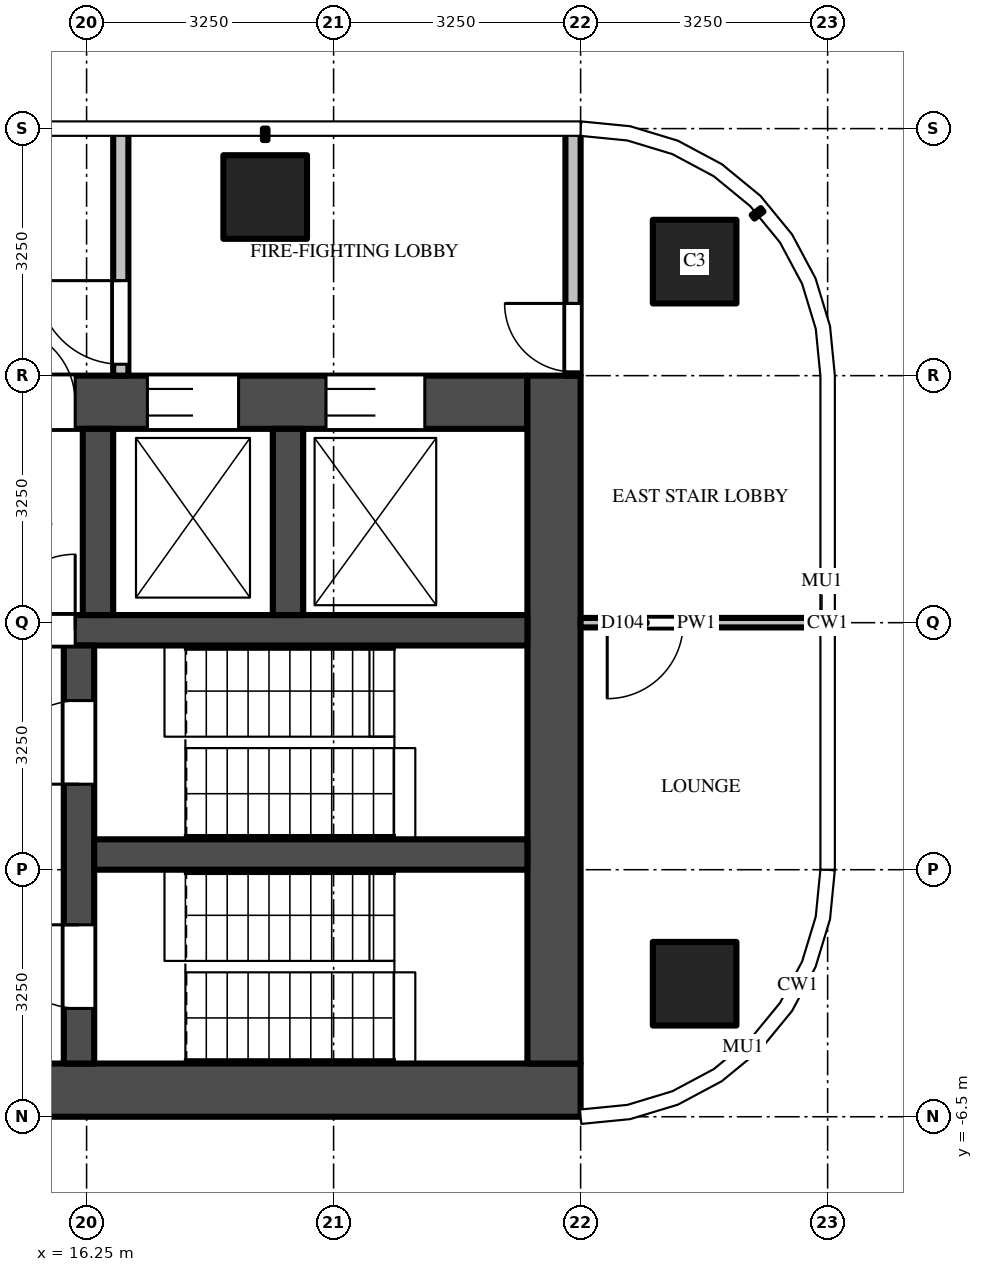
"""IFC4 building model, lengths in metres.
Left out: names, types, materials, properties, quantities, classifications, styles, units other than length and angle.
Written with IfcOpenShell. Run it as: python <this file> out.ifc"""

import sys

from ifc_helpers import new_model, si_unit, direction, frame, frame_2d, origin, origin_2d, place, context, subcontext, project, spatial, rectangle, extrude, source, transform, mapped, element, fill, save


model = new_model("IFC4")
c1 = context("Model", 3, precision=1e-05, world=origin(), true_north=direction((0.0, 1.0)))
c2 = subcontext(c1, "Body", "Model", "MODEL_VIEW")
j1 = project(units=[si_unit("LENGTHUNIT", "METRE"), si_unit("PLANEANGLEUNIT", "RADIAN")], contexts=[c1])
p1 = place(None, origin())
s1 = spatial("IfcSite", under=j1, at=p1, CompositionType="ELEMENT")
p2 = place(p1, origin())
s2 = spatial("IfcBuilding", under=s1, at=p2, CompositionType="ELEMENT")
p3 = place(p2, frame((0.0, 0.0, 251.9)))
s3 = spatial("IfcBuildingStorey", under=s2, at=p3, CompositionType="ELEMENT", Elevation=251.9)
m1 = source(origin(), c2, "Body", "SweptSolid", [
    extrude(rectangle(XDim=1.1, YDim=1.1, at=origin_2d()), origin(), (0.0, 0.0, 1.0), 3.9),
])
for number, where, z_axis, x_axis in (
    (1, (18.6, 5.6, 0.0), (0.0, 0.0, 1.0), (1.0, 0.0, 0.0)),
    (2, (24.25, 4.75, 0.0), (0.0, 0.0, 1.0), (1.0, 0.0, 0.0)),
    (3, (24.25, -4.75, 0.0), (0.0, 0.0, 1.0), (1.0, 0.0, 0.0)),
):
    element("IfcColumn", number, at=place(p3, frame(where, z_axis=z_axis, x_axis=x_axis)), inside=s3, PredefinedType="COLUMN", context=c2, shape_type="MappedRepresentation", body=[
        mapped(m1, transform((0.0, 0.0, 0.0))),
    ])
m2 = source(origin(), c2, "Body", "SweptSolid", [
    extrude(rectangle(XDim=16.6, YDim=0.7, at=frame_2d((8.3, 0.0))), origin(), (0.0, 0.0, 1.0), 3.7),
])
p4 = place(p3, frame((6.15, -6.15, 0.0), z_axis=(0.0, 0.0, 1.0), x_axis=(1.0, 0.0, 0.0)))
e4 = element("IfcWall", 4, at=p4, inside=s3, PredefinedType="SHEAR", context=c2, shape_type="MappedRepresentation", body=[
    mapped(m2, transform((0.0, 0.0, 0.0))),
])
m3 = source(origin(), c2, "Body", "SweptSolid", [
    extrude(rectangle(XDim=14.85, YDim=0.7, at=frame_2d((7.425, 0.0))), origin(), (0.0, 0.0, 1.0), 3.7),
])
p5 = place(p3, frame((7.2, 2.9, 0.0), z_axis=(0.0, 0.0, 1.0), x_axis=(1.0, 0.0, 0.0)))
e5 = element("IfcWall", 5, at=p5, inside=s3, PredefinedType="SHEAR", context=c2, shape_type="MappedRepresentation", body=[
    mapped(m3, transform((0.0, 0.0, 0.0))),
])
m4 = source(origin(), c2, "Body", "SweptSolid", [
    extrude(rectangle(XDim=1.1, YDim=2.1, at=frame_2d((0.55, 1.05))), frame((0.0, 0.36, 0.0), z_axis=(0.0, -1.0, 0.0), x_axis=(1.0, 0.0, 0.0)), (0.0, 0.0, 1.0), 0.72),
])
p6 = place(p5, frame((0.55, 0.0, 0.0)))
e6 = element("IfcOpeningElement", 6, at=p6, cuts=e5, PredefinedType="OPENING", context=c2, shape_type="MappedRepresentation", body=[
    mapped(m4, transform((0.0, 0.0, 0.0))),
])
p7 = place(p5, frame((3.15, 0.0, 0.0)))
e7 = element("IfcOpeningElement", 7, at=p7, cuts=e5, PredefinedType="OPENING", context=c2, shape_type="MappedRepresentation", body=[
    mapped(m4, transform((0.0, 0.0, 0.0))),
])
m5 = source(origin(), c2, "Body", "SweptSolid", [
    extrude(rectangle(XDim=1.2, YDim=2.1, at=frame_2d((0.6, 1.05))), frame((0.0, 0.36, 0.0), z_axis=(0.0, -1.0, 0.0), x_axis=(1.0, 0.0, 0.0)), (0.0, 0.0, 1.0), 0.72),
])
p8 = place(p5, frame((5.7, 0.0, 0.0)))
e8 = element("IfcOpeningElement", 8, at=p8, cuts=e5, PredefinedType="OPENING", context=c2, shape_type="MappedRepresentation", body=[
    mapped(m5, transform((0.0, 0.0, 0.0))),
])
m6 = source(origin(), c2, "Body", "SweptSolid", [
    extrude(rectangle(XDim=1.3, YDim=2.1, at=frame_2d((0.65, 1.05))), frame((0.0, 0.36, 0.0), z_axis=(0.0, -1.0, 0.0), x_axis=(1.0, 0.0, 0.0)), (0.0, 0.0, 1.0), 0.72),
])
p9 = place(p5, frame((12.2, 0.0, 0.0)))
e9 = element("IfcOpeningElement", 9, at=p9, cuts=e5, PredefinedType="OPENING", context=c2, shape_type="MappedRepresentation", body=[
    mapped(m6, transform((0.0, 0.0, 0.0))),
])
p10 = place(p5, frame((9.85, 0.0, 0.0)))
e10 = element("IfcOpeningElement", 10, at=p10, cuts=e5, PredefinedType="OPENING", context=c2, shape_type="MappedRepresentation", body=[
    mapped(m5, transform((0.0, 0.0, 0.0))),
])
m7 = source(origin(), c2, "Body", "SweptSolid", [
    extrude(rectangle(XDim=1.0, YDim=2.1, at=frame_2d((0.5, 1.05))), frame((0.0, 0.36, 0.0), z_axis=(0.0, -1.0, 0.0), x_axis=(1.0, 0.0, 0.0)), (0.0, 0.0, 1.0), 0.72),
])
p11 = place(p5, frame((7.9, 0.0, 0.0)))
e11 = element("IfcOpeningElement", 11, at=p11, cuts=e5, PredefinedType="OPENING", context=c2, shape_type="MappedRepresentation", body=[
    mapped(m7, transform((0.0, 0.0, 0.0))),
])
m8 = source(origin(), c2, "Body", "SweptSolid", [
    extrude(rectangle(XDim=9.05, YDim=0.7, at=frame_2d((4.525, 0.0))), origin(), (0.0, 0.0, 1.0), 3.7),
])
p12 = place(p3, frame((22.4, -5.8, 0.0), z_axis=(0.0, 0.0, 1.0), x_axis=(0.0, 1.0, 0.0)))
e12 = element("IfcWall", 12, at=p12, inside=s3, PredefinedType="SHEAR", context=c2, shape_type="MappedRepresentation", body=[
    mapped(m8, transform((0.0, 0.0, 0.0))),
])
m9 = source(origin(), c2, "Body", "SweptSolid", [
    extrude(rectangle(XDim=14.85, YDim=0.4, at=frame_2d((7.425, 0.0))), origin(), (0.0, 0.0, 1.0), 3.7),
])
p13 = place(p3, frame((7.2, -0.1, 0.0), z_axis=(0.0, 0.0, 1.0), x_axis=(1.0, 0.0, 0.0)))
e13 = element("IfcWall", 13, at=p13, inside=s3, PredefinedType="SHEAR", context=c2, shape_type="MappedRepresentation", body=[
    mapped(m9, transform((0.0, 0.0, 0.0))),
])
m10 = source(origin(), c2, "Body", "SweptSolid", [
    extrude(rectangle(XDim=1.0, YDim=2.1, at=frame_2d((0.5, 1.05))), frame((0.0, 0.21, 0.0), z_axis=(0.0, -1.0, 0.0), x_axis=(1.0, 0.0, 0.0)), (0.0, 0.0, 1.0), 0.42),
])
p14 = place(p13, frame((7.9, 0.0, 0.0)))
e14 = element("IfcOpeningElement", 14, at=p14, cuts=e13, PredefinedType="OPENING", context=c2, shape_type="MappedRepresentation", body=[
    mapped(m10, transform((0.0, 0.0, 0.0))),
])
m11 = source(origin(), c2, "Body", "SweptSolid", [
    extrude(rectangle(XDim=5.5, YDim=0.4, at=frame_2d((2.75, 0.0))), origin(), (0.0, 0.0, 1.0), 3.7),
])
p15 = place(p3, frame((16.15, -5.8, 0.0), z_axis=(0.0, 0.0, 1.0), x_axis=(0.0, 1.0, 0.0)))
e15 = element("IfcWall", 15, at=p15, inside=s3, PredefinedType="SHEAR", context=c2, shape_type="MappedRepresentation", body=[
    mapped(m11, transform((0.0, 0.0, 0.0))),
])
m12 = source(origin(), c2, "Body", "SweptSolid", [
    extrude(rectangle(XDim=1.1, YDim=2.1, at=frame_2d((0.55, 1.05))), frame((0.0, 0.21, 0.0), z_axis=(0.0, -1.0, 0.0), x_axis=(1.0, 0.0, 0.0)), (0.0, 0.0, 1.0), 0.42),
])
p16 = place(p15, frame((0.725, 0.0, 0.0)))
e16 = element("IfcOpeningElement", 16, at=p16, cuts=e15, PredefinedType="OPENING", context=c2, shape_type="MappedRepresentation", body=[
    mapped(m12, transform((0.0, 0.0, 0.0))),
])
p17 = place(p15, frame((3.675, 0.0, 0.0)))
e17 = element("IfcOpeningElement", 17, at=p17, cuts=e15, PredefinedType="OPENING", context=c2, shape_type="MappedRepresentation", body=[
    mapped(m12, transform((0.0, 0.0, 0.0))),
])
m13 = source(origin(), c2, "Body", "SweptSolid", [
    extrude(rectangle(XDim=5.7, YDim=0.4, at=frame_2d((2.85, 0.0))), origin(), (0.0, 0.0, 1.0), 3.7),
])
p18 = place(p3, frame((16.35, -3.05, 0.0), z_axis=(0.0, 0.0, 1.0), x_axis=(1.0, 0.0, 0.0)))
e18 = element("IfcWall", 18, at=p18, inside=s3, PredefinedType="SHEAR", context=c2, shape_type="MappedRepresentation", body=[
    mapped(m13, transform((0.0, 0.0, 0.0))),
])
m14 = source(origin(), c2, "Body", "SweptSolid", [
    extrude(rectangle(XDim=2.45, YDim=0.4, at=frame_2d((1.225, 0.0))), origin(), (0.0, 0.0, 1.0), 3.7),
])
for number, where, z_axis, x_axis in (
    (19, (16.4, 0.1, 0.0), (0.0, 0.0, 1.0), (0.0, 1.0, 0.0)),
    (20, (18.9, 0.1, 0.0), (0.0, 0.0, 1.0), (0.0, 1.0, 0.0)),
):
    element("IfcWall", number, at=place(p3, frame(where, z_axis=z_axis, x_axis=x_axis)), inside=s3, PredefinedType="SHEAR", context=c2, shape_type="MappedRepresentation", body=[
        mapped(m14, transform((0.0, 0.0, 0.0))),
    ])
m15 = source(origin(), c2, "Body", "SweptSolid", [
    extrude(rectangle(XDim=3.25, YDim=0.2, at=frame_2d((1.625, 0.0))), origin(), (0.0, 0.0, 1.0), 3.7),
])
p19 = place(p3, frame((16.7, 3.25, 0.0), z_axis=(0.0, 0.0, 1.0), x_axis=(0.0, 1.0, 0.0)))
e21 = element("IfcWall", 21, at=p19, inside=s3, PredefinedType="PARTITIONING", context=c2, shape_type="MappedRepresentation", body=[
    mapped(m15, transform((0.0, 0.0, 0.0))),
])
m16 = source(origin(), c2, "Body", "SweptSolid", [
    extrude(rectangle(XDim=1.1, YDim=2.1, at=frame_2d((0.55, 1.05))), frame((0.0, 0.11, 0.0), z_axis=(0.0, -1.0, 0.0), x_axis=(1.0, 0.0, 0.0)), (0.0, 0.0, 1.0), 0.22),
])
p20 = place(p19, frame((0.15, 0.0, 0.0)))
e22 = element("IfcOpeningElement", 22, at=p20, cuts=e21, PredefinedType="OPENING", context=c2, shape_type="MappedRepresentation", body=[
    mapped(m16, transform((0.0, 0.0, 0.0))),
])
p21 = place(p3, frame((22.65, 3.25, 0.0), z_axis=(0.0, 0.0, 1.0), x_axis=(0.0, 1.0, 0.0)))
e23 = element("IfcWall", 23, at=p21, inside=s3, PredefinedType="PARTITIONING", context=c2, shape_type="MappedRepresentation", body=[
    mapped(m15, transform((0.0, 0.0, 0.0))),
])
m17 = source(origin(), c2, "Body", "SweptSolid", [
    extrude(rectangle(XDim=0.9, YDim=2.1, at=frame_2d((0.45, 1.05))), frame((0.0, 0.11, 0.0), z_axis=(0.0, -1.0, 0.0), x_axis=(1.0, 0.0, 0.0)), (0.0, 0.0, 1.0), 0.22),
])
p22 = place(p21, frame((0.05, 0.0, 0.0)))
e24 = element("IfcOpeningElement", 24, at=p22, cuts=e23, PredefinedType="OPENING", context=c2, shape_type="MappedRepresentation", body=[
    mapped(m17, transform((0.0, 0.0, 0.0))),
])
m18 = source(origin(), c2, "Body", "SweptSolid", [
    extrude(rectangle(XDim=3.05, YDim=0.125, at=frame_2d((1.525, 0.0))), origin(), (0.0, 0.0, 1.0), 2.78),
])
p23 = place(p3, frame((25.8, 0.0, 0.0), z_axis=(0.0, 0.0, 1.0), x_axis=(-1.0, 0.0, 0.0)))
e25 = element("IfcWall", 25, at=p23, inside=s3, PredefinedType="PARTITIONING", context=c2, shape_type="MappedRepresentation", body=[
    mapped(m18, transform((0.0, 0.0, 0.0))),
])
m19 = source(origin(), c2, "Body", "SweptSolid", [
    extrude(rectangle(XDim=1.0, YDim=2.1, at=frame_2d((0.5, 1.05))), frame((0.0, 0.073, 0.0), z_axis=(0.0, -1.0, 0.0), x_axis=(1.0, 0.0, 0.0)), (0.0, 0.0, 1.0), 0.145),
])
p24 = place(p23, frame((1.7, 0.0, 0.0)))
e26 = element("IfcOpeningElement", 26, at=p24, cuts=e25, PredefinedType="OPENING", context=c2, shape_type="MappedRepresentation", body=[
    mapped(m19, transform((0.0, 0.0, 0.0))),
])
m20 = source(origin(), c2, "Body", "SweptSolid", [
    extrude(rectangle(XDim=1.3, YDim=2.1, at=frame_2d((0.65, 1.05))), frame((0.0, -0.275, 0.0), z_axis=(0.0, -1.0, 0.0), x_axis=(1.0, 0.0, 0.0)), (0.0, 0.0, 1.0), 0.05),
])
p25 = place(p9, origin())
e27 = element("IfcDoor", 27, at=p25, inside=s3, OperationType="DOUBLE_DOOR_SLIDING", PredefinedType="DOOR", context=c2, shape_type="MappedRepresentation", body=[
    mapped(m20, transform((0.0, 0.0, 0.0))),
])
fill(e9, e27)
m21 = source(origin(), c2, "Body", "SweptSolid", [
    extrude(rectangle(XDim=1.2, YDim=2.1, at=frame_2d((0.6, 1.05))), frame((0.0, -0.275, 0.0), z_axis=(0.0, -1.0, 0.0), x_axis=(1.0, 0.0, 0.0)), (0.0, 0.0, 1.0), 0.05),
])
p26 = place(p10, origin())
e28 = element("IfcDoor", 28, at=p26, inside=s3, OperationType="DOUBLE_DOOR_SLIDING", PredefinedType="DOOR", context=c2, shape_type="MappedRepresentation", body=[
    mapped(m21, transform((0.0, 0.0, 0.0))),
])
fill(e10, e28)
m22 = source(origin(), c2, "Body", "SweptSolid", [
    extrude(rectangle(XDim=1.1, YDim=2.1, at=frame_2d((0.55, 1.05))), frame((0.0, 0.025, 0.0), z_axis=(0.0, -1.0, 0.0), x_axis=(1.0, 0.0, 0.0)), (0.0, 0.0, 1.0), 0.05),
])
p27 = place(p16, origin())
e29 = element("IfcDoor", 29, at=p27, inside=s3, OperationType="SINGLE_SWING_RIGHT", PredefinedType="DOOR", context=c2, shape_type="MappedRepresentation", body=[
    mapped(m22, transform((0.0, 0.0, 0.0))),
])
fill(e16, e29)
p28 = place(p17, origin())
e30 = element("IfcDoor", 30, at=p28, inside=s3, OperationType="SINGLE_SWING_LEFT", PredefinedType="DOOR", context=c2, shape_type="MappedRepresentation", body=[
    mapped(m22, transform((0.0, 0.0, 0.0))),
])
fill(e17, e30)
m23 = source(origin(), c2, "Body", "SweptSolid", [
    extrude(rectangle(XDim=1.0, YDim=2.1, at=frame_2d((0.5, 1.05))), frame((0.0, 0.025, 0.0), z_axis=(0.0, -1.0, 0.0), x_axis=(1.0, 0.0, 0.0)), (0.0, 0.0, 1.0), 0.05),
])
p29 = place(p14, origin())
e31 = element("IfcDoor", 31, at=p29, inside=s3, OperationType="SINGLE_SWING_RIGHT", PredefinedType="DOOR", context=c2, shape_type="MappedRepresentation", body=[
    mapped(m23, transform((0.0, 0.0, 0.0))),
])
fill(e14, e31)
m24 = source(origin(), c2, "Body", "SweptSolid", [
    extrude(rectangle(XDim=1.0, YDim=2.1, at=frame_2d((0.5, 1.05))), frame((0.0, -0.275, 0.0), z_axis=(0.0, -1.0, 0.0), x_axis=(1.0, 0.0, 0.0)), (0.0, 0.0, 1.0), 0.05),
])
p30 = place(p11, origin())
e32 = element("IfcDoor", 32, at=p30, inside=s3, OperationType="SINGLE_SWING_LEFT", PredefinedType="DOOR", context=c2, shape_type="MappedRepresentation", body=[
    mapped(m24, transform((0.0, 0.0, 0.0))),
])
fill(e11, e32)
p31 = place(p20, origin())
e33 = element("IfcDoor", 33, at=p31, inside=s3, OperationType="SINGLE_SWING_RIGHT", PredefinedType="DOOR", context=c2, shape_type="MappedRepresentation", body=[
    mapped(m22, transform((0.0, 0.0, 0.0))),
])
fill(e22, e33)
m25 = source(origin(), c2, "Body", "SweptSolid", [
    extrude(rectangle(XDim=0.9, YDim=2.1, at=frame_2d((0.45, 1.05))), frame((0.0, 0.025, 0.0), z_axis=(0.0, -1.0, 0.0), x_axis=(1.0, 0.0, 0.0)), (0.0, 0.0, 1.0), 0.05),
])
p32 = place(p22, origin())
e34 = element("IfcDoor", 34, at=p32, inside=s3, OperationType="SINGLE_SWING_RIGHT", PredefinedType="DOOR", context=c2, shape_type="MappedRepresentation", body=[
    mapped(m25, transform((0.0, 0.0, 0.0))),
])
fill(e24, e34)
p33 = place(p24, origin())
e35 = element("IfcDoor", 35, at=p33, inside=s3, OperationType="SINGLE_SWING_RIGHT", PredefinedType="DOOR", context=c2, shape_type="MappedRepresentation", body=[
    mapped(m23, transform((0.0, 0.0, 0.0))),
])
fill(e26, e35)
save(model, sys.argv[1])
